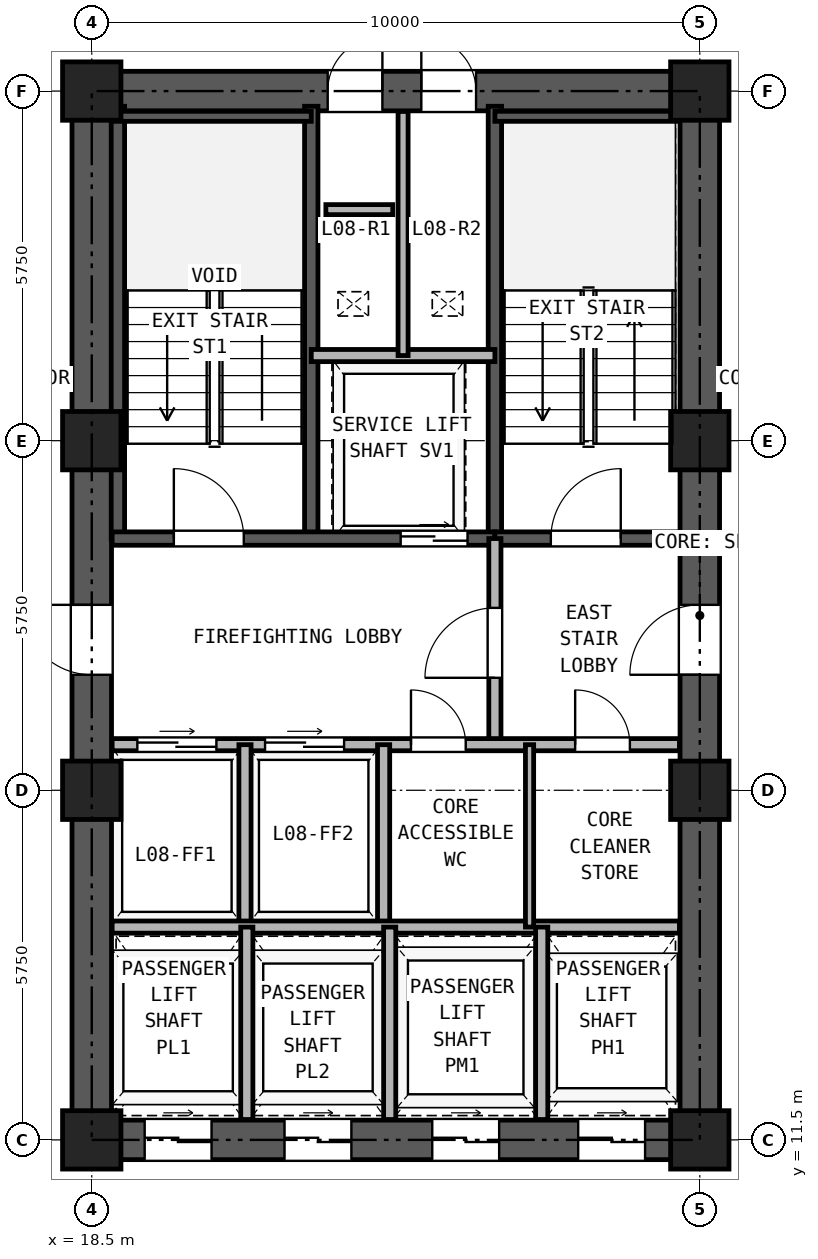
"""IFC4 building model, lengths in metres.
Left out: names, types, materials, properties, quantities, classifications, styles, units other than length and angle.
Written with IfcOpenShell. Run it as: python <this file> out.ifc"""

import sys

from ifc_helpers import new_model, si_unit, direction, frame, frame_2d, origin, origin_2d, place, context, subcontext, project, spatial, rectangle, hollow_rectangle, extrude, source, transform, mapped, element, fill, save


model = new_model("IFC4")
c1 = context("Model", 3, precision=1e-05, world=origin(), true_north=direction((0.0, 1.0)))
c2 = subcontext(c1, "Body", "Model", "MODEL_VIEW")
j1 = project(units=[si_unit("LENGTHUNIT", "METRE"), si_unit("PLANEANGLEUNIT", "RADIAN")], contexts=[c1])
p1 = place(None, origin())
s1 = spatial("IfcSite", under=j1, at=p1, CompositionType="ELEMENT")
p2 = place(p1, origin())
s2 = spatial("IfcBuilding", under=s1, at=p2, CompositionType="ELEMENT")
p3 = place(p2, frame((0.0, 0.0, 33.3)))
s3 = spatial("IfcBuildingStorey", under=s2, at=p3, CompositionType="ELEMENT", Elevation=33.3)
m1 = source(origin(), c2, "Body", "SweptSolid", [
    extrude(hollow_rectangle(XDim=0.96, YDim=0.96, WallThickness=0.06, at=origin_2d()), origin(), (0.0, 0.0, 1.0), 3.32),
])
for number, where, z_axis, x_axis in (
    (1, (18.5, 11.5, 0.0), (0.0, 0.0, 1.0), (1.0, 0.0, 0.0)),
    (2, (18.5, 17.25, 0.0), (0.0, 0.0, 1.0), (1.0, 0.0, 0.0)),
    (3, (18.5, 23.0, 0.0), (0.0, 0.0, 1.0), (1.0, 0.0, 0.0)),
    (4, (18.5, 28.75, 0.0), (0.0, 0.0, 1.0), (1.0, 0.0, 0.0)),
    (5, (28.5, 11.5, 0.0), (0.0, 0.0, 1.0), (1.0, 0.0, 0.0)),
    (6, (28.5, 17.25, 0.0), (0.0, 0.0, 1.0), (1.0, 0.0, 0.0)),
    (7, (28.5, 23.0, 0.0), (0.0, 0.0, 1.0), (1.0, 0.0, 0.0)),
    (8, (28.5, 28.75, 0.0), (0.0, 0.0, 1.0), (1.0, 0.0, 0.0)),
):
    element("IfcColumn", number, at=place(p3, frame(where, z_axis=z_axis, x_axis=x_axis)), inside=s3, PredefinedType="COLUMN", context=c2, shape_type="MappedRepresentation", body=[
        mapped(m1, transform((0.0, 0.0, 0.0), x_axis=(1.0, 0.0, 0.0), y_axis=(0.0, 1.0, 0.0), z_axis=(0.0, 0.0, 1.0), scale=1.0)),
    ])
p4 = place(p3, frame((18.175, 11.5, 0.0), z_axis=(0.0, 0.0, 1.0), x_axis=(1.0, 0.0, 0.0)))
e9 = element("IfcWall", 9, at=p4, inside=s3, PredefinedType="SHEAR", context=c2, shape_type="SweptSolid", body=[
    extrude(rectangle(XDim=10.65, YDim=0.65, at=frame_2d((5.325, 0.0))), origin(), (0.0, 0.0, 1.0), 3.32),
])
p5 = place(p4, frame((1.195, 0.0, 0.0)))
e10 = element("IfcOpeningElement", 10, at=p5, cuts=e9, PredefinedType="OPENING", context=c2, shape_type="SweptSolid", body=[
    extrude(rectangle(XDim=1.1, YDim=2.25, at=frame_2d((0.55, 1.125))), frame((0.0, 0.335, 0.0), z_axis=(0.0, -1.0, 0.0), x_axis=(1.0, 0.0, 0.0)), (0.0, 0.0, 1.0), 0.67),
])
p6 = place(p4, frame((3.495, 0.0, 0.0)))
e11 = element("IfcOpeningElement", 11, at=p6, cuts=e9, PredefinedType="OPENING", context=c2, shape_type="SweptSolid", body=[
    extrude(rectangle(XDim=1.1, YDim=2.25, at=frame_2d((0.55, 1.125))), frame((0.0, 0.335, 0.0), z_axis=(0.0, -1.0, 0.0), x_axis=(1.0, 0.0, 0.0)), (0.0, 0.0, 1.0), 0.67),
])
p7 = place(p4, frame((5.925, 0.0, 0.0)))
e12 = element("IfcOpeningElement", 12, at=p7, cuts=e9, PredefinedType="OPENING", context=c2, shape_type="SweptSolid", body=[
    extrude(rectangle(XDim=1.1, YDim=2.25, at=frame_2d((0.55, 1.125))), frame((0.0, 0.335, 0.0), z_axis=(0.0, -1.0, 0.0), x_axis=(1.0, 0.0, 0.0)), (0.0, 0.0, 1.0), 0.67),
])
p8 = place(p4, frame((8.325, 0.0, 0.0)))
e13 = element("IfcOpeningElement", 13, at=p8, cuts=e9, PredefinedType="OPENING", context=c2, shape_type="SweptSolid", body=[
    extrude(rectangle(XDim=1.1, YDim=2.25, at=frame_2d((0.55, 1.125))), frame((0.0, 0.335, 0.0), z_axis=(0.0, -1.0, 0.0), x_axis=(1.0, 0.0, 0.0)), (0.0, 0.0, 1.0), 0.67),
])
p9 = place(p3, frame((18.175, 28.75, 0.0), z_axis=(0.0, 0.0, 1.0), x_axis=(1.0, 0.0, 0.0)))
e14 = element("IfcWall", 14, at=p9, inside=s3, PredefinedType="SHEAR", context=c2, shape_type="SweptSolid", body=[
    extrude(rectangle(XDim=10.65, YDim=0.65, at=frame_2d((5.325, 0.0))), origin(), (0.0, 0.0, 1.0), 3.32),
])
p10 = place(p9, frame((4.205, 0.0, 0.0)))
e15 = element("IfcOpeningElement", 15, at=p10, cuts=e14, PredefinedType="OPENING", context=c2, shape_type="SweptSolid", body=[
    extrude(rectangle(XDim=0.9, YDim=2.05, at=frame_2d((0.45, 1.025))), frame((0.0, 0.335, 0.0), z_axis=(0.0, -1.0, 0.0), x_axis=(1.0, 0.0, 0.0)), (0.0, 0.0, 1.0), 0.67),
])
p11 = place(p9, frame((5.745, 0.0, 0.0)))
e16 = element("IfcOpeningElement", 16, at=p11, cuts=e14, PredefinedType="OPENING", context=c2, shape_type="SweptSolid", body=[
    extrude(rectangle(XDim=0.9, YDim=2.05, at=frame_2d((0.45, 1.025))), frame((0.0, 0.335, 0.0), z_axis=(0.0, -1.0, 0.0), x_axis=(1.0, 0.0, 0.0)), (0.0, 0.0, 1.0), 0.67),
])
p12 = place(p3, frame((18.5, 11.825, 0.0), z_axis=(0.0, 0.0, 1.0), x_axis=(0.0, 1.0, 0.0)))
e17 = element("IfcWall", 17, at=p12, inside=s3, PredefinedType="SHEAR", context=c2, shape_type="SweptSolid", body=[
    extrude(rectangle(XDim=16.6, YDim=0.65, at=frame_2d((8.3, 0.0))), origin(), (0.0, 0.0, 1.0), 3.32),
])
p13 = place(p12, frame((7.325, 0.0, 0.0)))
e18 = element("IfcOpeningElement", 18, at=p13, cuts=e17, PredefinedType="OPENING", context=c2, shape_type="SweptSolid", body=[
    extrude(rectangle(XDim=1.15, YDim=2.2, at=frame_2d((0.575, 1.1))), frame((0.0, 0.335, 0.0), z_axis=(0.0, -1.0, 0.0), x_axis=(1.0, 0.0, 0.0)), (0.0, 0.0, 1.0), 0.67),
])
p14 = place(p3, frame((28.5, 11.825, 0.0), z_axis=(0.0, 0.0, 1.0), x_axis=(0.0, 1.0, 0.0)))
e19 = element("IfcWall", 19, at=p14, inside=s3, PredefinedType="SHEAR", context=c2, shape_type="SweptSolid", body=[
    extrude(rectangle(XDim=16.6, YDim=0.65, at=frame_2d((8.3, 0.0))), origin(), (0.0, 0.0, 1.0), 3.32),
])
p15 = place(p14, frame((7.325, 0.0, 0.0)))
e20 = element("IfcOpeningElement", 20, at=p15, cuts=e19, PredefinedType="OPENING", context=c2, shape_type="SweptSolid", body=[
    extrude(rectangle(XDim=1.15, YDim=2.2, at=frame_2d((0.575, 1.1))), frame((0.0, 0.335, 0.0), z_axis=(0.0, -1.0, 0.0), x_axis=(1.0, 0.0, 0.0)), (0.0, 0.0, 1.0), 0.67),
])
for number, where, z_axis, x_axis in (
    (21, (18.93, 21.39, 0.0), (0.0, 0.0, 1.0), (0.0, 1.0, 0.0)),
    (22, (22.11, 21.39, 0.0), (0.0, 0.0, 1.0), (0.0, 1.0, 0.0)),
    (23, (25.13, 21.39, 0.0), (0.0, 0.0, 1.0), (0.0, 1.0, 0.0)),
):
    element("IfcWall", number, at=place(p3, frame(where, z_axis=z_axis, x_axis=x_axis)), inside=s3, PredefinedType="SOLIDWALL", context=c2, shape_type="SweptSolid", body=[
        extrude(rectangle(XDim=7.11, YDim=0.22, at=frame_2d((3.555, 0.0))), origin(), (0.0, 0.0, 1.0), 3.32),
    ])
p16 = place(p3, frame((18.835, 28.335, 0.0), z_axis=(0.0, 0.0, 1.0), x_axis=(1.0, 0.0, 0.0)))
e24 = element("IfcWall", 24, at=p16, inside=s3, PredefinedType="PARTITIONING", context=c2, shape_type="SweptSolid", body=[
    extrude(rectangle(XDim=3.275, YDim=0.165, at=frame_2d((1.638, 0.0))), origin(), (0.0, 0.0, 1.0), 3.32),
])
p17 = place(p3, frame((25.13, 28.335, 0.0), z_axis=(0.0, 0.0, 1.0), x_axis=(1.0, 0.0, 0.0)))
e25 = element("IfcWall", 25, at=p17, inside=s3, PredefinedType="PARTITIONING", context=c2, shape_type="SweptSolid", body=[
    extrude(rectangle(XDim=3.035, YDim=0.165, at=frame_2d((1.518, 0.0))), origin(), (0.0, 0.0, 1.0), 3.32),
])
p18 = place(p3, frame((18.835, 21.39, 0.0), z_axis=(0.0, 0.0, 1.0), x_axis=(1.0, 0.0, 0.0)))
e26 = element("IfcWall", 26, at=p18, inside=s3, PredefinedType="SOLIDWALL", context=c2, shape_type="SweptSolid", body=[
    extrude(rectangle(XDim=6.295, YDim=0.22, at=frame_2d((3.147, 0.0))), origin(), (0.0, 0.0, 1.0), 3.32),
])
p19 = place(p18, frame((1.015, 0.0, 0.0)))
e27 = element("IfcOpeningElement", 27, at=p19, cuts=e26, PredefinedType="OPENING", context=c2, shape_type="SweptSolid", body=[
    extrude(rectangle(XDim=1.15, YDim=2.2, at=frame_2d((0.575, 1.1))), frame((0.0, 0.12, 0.0), z_axis=(0.0, -1.0, 0.0), x_axis=(1.0, 0.0, 0.0)), (0.0, 0.0, 1.0), 0.24),
])
p20 = place(p18, frame((4.745, 0.0, 0.0)))
e28 = element("IfcOpeningElement", 28, at=p20, cuts=e26, PredefinedType="OPENING", context=c2, shape_type="SweptSolid", body=[
    extrude(rectangle(XDim=1.1, YDim=2.25, at=frame_2d((0.55, 1.125))), frame((0.0, 0.12, 0.0), z_axis=(0.0, -1.0, 0.0), x_axis=(1.0, 0.0, 0.0)), (0.0, 0.0, 1.0), 0.24),
])
p21 = place(p3, frame((25.13, 21.39, 0.0), z_axis=(0.0, 0.0, 1.0), x_axis=(1.0, 0.0, 0.0)))
e29 = element("IfcWall", 29, at=p21, inside=s3, PredefinedType="SOLIDWALL", context=c2, shape_type="SweptSolid", body=[
    extrude(rectangle(XDim=3.035, YDim=0.22, at=frame_2d((1.518, 0.0))), origin(), (0.0, 0.0, 1.0), 3.32),
])
p22 = place(p21, frame((0.92, 0.0, 0.0)))
e30 = element("IfcOpeningElement", 30, at=p22, cuts=e29, PredefinedType="OPENING", context=c2, shape_type="SweptSolid", body=[
    extrude(rectangle(XDim=1.15, YDim=2.2, at=frame_2d((0.575, 1.1))), frame((0.0, 0.12, 0.0), z_axis=(0.0, -1.0, 0.0), x_axis=(1.0, 0.0, 0.0)), (0.0, 0.0, 1.0), 0.24),
])
p23 = place(p3, frame((22.11, 24.4, 0.0), z_axis=(0.0, 0.0, 1.0), x_axis=(1.0, 0.0, 0.0)))
e31 = element("IfcWall", 31, at=p23, inside=s3, PredefinedType="PARTITIONING", context=c2, shape_type="SweptSolid", body=[
    extrude(rectangle(XDim=3.02, YDim=0.2, at=frame_2d((1.51, 0.0))), origin(), (0.0, 0.0, 1.0), 3.32),
])
p24 = place(p3, frame((23.62, 24.4, 0.0), z_axis=(0.0, 0.0, 1.0), x_axis=(0.0, 1.0, 0.0)))
e32 = element("IfcWall", 32, at=p24, inside=s3, PredefinedType="PARTITIONING", context=c2, shape_type="SweptSolid", body=[
    extrude(rectangle(XDim=4.015, YDim=0.165, at=frame_2d((2.008, 0.0))), origin(), (0.0, 0.0, 1.0), 3.32),
])
p25 = place(p3, frame((25.13, 18.0, 0.0), z_axis=(0.0, 0.0, 1.0), x_axis=(0.0, 1.0, 0.0)))
e33 = element("IfcWall", 33, at=p25, inside=s3, PredefinedType="PARTITIONING", context=c2, shape_type="SweptSolid", body=[
    extrude(rectangle(XDim=3.39, YDim=0.2, at=frame_2d((1.695, 0.0))), origin(), (0.0, 0.0, 1.0), 3.32),
])
p26 = place(p25, frame((1.1, 0.0, 0.0)))
e34 = element("IfcOpeningElement", 34, at=p26, cuts=e33, PredefinedType="OPENING", context=c2, shape_type="SweptSolid", body=[
    extrude(rectangle(XDim=1.15, YDim=2.2, at=frame_2d((0.575, 1.1))), frame((0.0, 0.11, 0.0), z_axis=(0.0, -1.0, 0.0), x_axis=(1.0, 0.0, 0.0)), (0.0, 0.0, 1.0), 0.22),
])
p27 = place(p3, frame((18.835, 18.0, 0.0), z_axis=(0.0, 0.0, 1.0), x_axis=(1.0, 0.0, 0.0)))
e35 = element("IfcWall", 35, at=p27, inside=s3, PredefinedType="PARTITIONING", context=c2, shape_type="SweptSolid", body=[
    extrude(rectangle(XDim=9.33, YDim=0.2, at=frame_2d((4.665, 0.0))), origin(), (0.0, 0.0, 1.0), 3.32),
])
p28 = place(p27, frame((0.415, 0.0, 0.0)))
e36 = element("IfcOpeningElement", 36, at=p28, cuts=e35, PredefinedType="OPENING", context=c2, shape_type="SweptSolid", body=[
    extrude(rectangle(XDim=1.3, YDim=2.3, at=frame_2d((0.65, 1.15))), frame((0.0, 0.11, 0.0), z_axis=(0.0, -1.0, 0.0), x_axis=(1.0, 0.0, 0.0)), (0.0, 0.0, 1.0), 0.22),
])
p29 = place(p27, frame((2.515, 0.0, 0.0)))
e37 = element("IfcOpeningElement", 37, at=p29, cuts=e35, PredefinedType="OPENING", context=c2, shape_type="SweptSolid", body=[
    extrude(rectangle(XDim=1.3, YDim=2.3, at=frame_2d((0.65, 1.15))), frame((0.0, 0.11, 0.0), z_axis=(0.0, -1.0, 0.0), x_axis=(1.0, 0.0, 0.0)), (0.0, 0.0, 1.0), 0.22),
])
p30 = place(p27, frame((4.915, 0.0, 0.0)))
e38 = element("IfcOpeningElement", 38, at=p30, cuts=e35, PredefinedType="OPENING", context=c2, shape_type="SweptSolid", body=[
    extrude(rectangle(XDim=0.9, YDim=2.05, at=frame_2d((0.45, 1.025))), frame((0.0, 0.11, 0.0), z_axis=(0.0, -1.0, 0.0), x_axis=(1.0, 0.0, 0.0)), (0.0, 0.0, 1.0), 0.22),
])
p31 = place(p27, frame((7.615, 0.0, 0.0)))
e39 = element("IfcOpeningElement", 39, at=p31, cuts=e35, PredefinedType="OPENING", context=c2, shape_type="SweptSolid", body=[
    extrude(rectangle(XDim=0.9, YDim=2.05, at=frame_2d((0.45, 1.025))), frame((0.0, 0.11, 0.0), z_axis=(0.0, -1.0, 0.0), x_axis=(1.0, 0.0, 0.0)), (0.0, 0.0, 1.0), 0.22),
])
for number, where, z_axis, x_axis in (
    (40, (21.02, 15.0, 0.0), (0.0, 0.0, 1.0), (0.0, 1.0, 0.0)),
    (41, (23.3, 15.0, 0.0), (0.0, 0.0, 1.0), (0.0, 1.0, 0.0)),
):
    element("IfcWall", number, at=place(p3, frame(where, z_axis=z_axis, x_axis=x_axis)), inside=s3, PredefinedType="PARTITIONING", context=c2, shape_type="SweptSolid", body=[
        extrude(rectangle(XDim=3.0, YDim=0.2, at=frame_2d((1.5, 0.0))), origin(), (0.0, 0.0, 1.0), 3.32),
    ])
p32 = place(p3, frame((18.835, 15.0, 0.0), z_axis=(0.0, 0.0, 1.0), x_axis=(1.0, 0.0, 0.0)))
e42 = element("IfcWall", 42, at=p32, inside=s3, PredefinedType="PARTITIONING", context=c2, shape_type="SweptSolid", body=[
    extrude(rectangle(XDim=9.33, YDim=0.2, at=frame_2d((4.665, 0.0))), origin(), (0.0, 0.0, 1.0), 3.32),
])
p33 = place(p3, frame((25.7, 15.0, 0.0), z_axis=(0.0, 0.0, 1.0), x_axis=(0.0, 1.0, 0.0)))
e43 = element("IfcWall", 43, at=p33, inside=s3, PredefinedType="PARTITIONING", context=c2, shape_type="SweptSolid", body=[
    extrude(rectangle(XDim=3.0, YDim=0.135, at=frame_2d((1.5, 0.0))), origin(), (0.0, 0.0, 1.0), 3.32),
])
for number, where, z_axis, x_axis in (
    (44, (21.05, 11.835, 0.0), (0.0, 0.0, 1.0), (0.0, 1.0, 0.0)),
    (45, (23.4, 11.835, 0.0), (0.0, 0.0, 1.0), (0.0, 1.0, 0.0)),
    (46, (25.9, 11.835, 0.0), (0.0, 0.0, 1.0), (0.0, 1.0, 0.0)),
):
    element("IfcWall", number, at=place(p3, frame(where, z_axis=z_axis, x_axis=x_axis)), inside=s3, PredefinedType="PARTITIONING", context=c2, shape_type="SweptSolid", body=[
        extrude(rectangle(XDim=3.165, YDim=0.2, at=frame_2d((1.583, 0.0))), origin(), (0.0, 0.0, 1.0), 3.32),
    ])
p34 = place(p3, frame((22.35, 26.8, 0.0), z_axis=(0.0, 0.0, 1.0), x_axis=(1.0, 0.0, 0.0)))
e47 = element("IfcWall", 47, at=p34, inside=s3, PredefinedType="PARTITIONING", context=c2, shape_type="SweptSolid", body=[
    extrude(rectangle(XDim=1.1, YDim=0.165, at=frame_2d((0.55, 0.0))), origin(), (0.0, 0.0, 1.0), 3.32),
])
p35 = place(p19, frame((1.15, 0.0, 0.0), z_axis=(0.0, 0.0, 1.0), x_axis=(-1.0, 0.0, 0.0)))
e48 = element("IfcDoor", 48, at=p35, inside=s3, OperationType="SINGLE_SWING_LEFT", PredefinedType="DOOR", context=c2, shape_type="SweptSolid", body=[
    extrude(rectangle(XDim=1.15, YDim=2.2, at=frame_2d((0.575, 1.1))), frame((0.0, 0.025, 0.0), z_axis=(0.0, -1.0, 0.0), x_axis=(1.0, 0.0, 0.0)), (0.0, 0.0, 1.0), 0.05),
])
fill(e27, e48)
p36 = place(p22, frame((1.15, 0.0, 0.0), z_axis=(0.0, 0.0, 1.0), x_axis=(-1.0, 0.0, 0.0)))
e49 = element("IfcDoor", 49, at=p36, inside=s3, OperationType="SINGLE_SWING_RIGHT", PredefinedType="DOOR", context=c2, shape_type="SweptSolid", body=[
    extrude(rectangle(XDim=1.15, YDim=2.2, at=frame_2d((0.575, 1.1))), frame((0.0, 0.025, 0.0), z_axis=(0.0, -1.0, 0.0), x_axis=(1.0, 0.0, 0.0)), (0.0, 0.0, 1.0), 0.05),
])
fill(e30, e49)
p37 = place(p20, frame((1.1, 0.0, 0.0), z_axis=(0.0, 0.0, 1.0), x_axis=(-1.0, 0.0, 0.0)))
e50 = element("IfcDoor", 50, at=p37, inside=s3, OperationType="DOUBLE_DOOR_SLIDING", PredefinedType="DOOR", context=c2, shape_type="SweptSolid", body=[
    extrude(rectangle(XDim=1.1, YDim=2.25, at=frame_2d((0.55, 1.125))), frame((0.0, 0.025, 0.0), z_axis=(0.0, -1.0, 0.0), x_axis=(1.0, 0.0, 0.0)), (0.0, 0.0, 1.0), 0.05),
])
fill(e28, e50)
p38 = place(p26, origin())
e51 = element("IfcDoor", 51, at=p38, inside=s3, OperationType="SINGLE_SWING_LEFT", PredefinedType="DOOR", context=c2, shape_type="SweptSolid", body=[
    extrude(rectangle(XDim=1.15, YDim=2.2, at=frame_2d((0.575, 1.1))), frame((0.0, 0.025, 0.0), z_axis=(0.0, -1.0, 0.0), x_axis=(1.0, 0.0, 0.0)), (0.0, 0.0, 1.0), 0.05),
])
fill(e34, e51)
p39 = place(p28, origin())
e52 = element("IfcDoor", 52, at=p39, inside=s3, OperationType="DOUBLE_DOOR_SLIDING", PredefinedType="DOOR", context=c2, shape_type="SweptSolid", body=[
    extrude(rectangle(XDim=1.3, YDim=2.3, at=frame_2d((0.65, 1.15))), frame((0.0, 0.025, 0.0), z_axis=(0.0, -1.0, 0.0), x_axis=(1.0, 0.0, 0.0)), (0.0, 0.0, 1.0), 0.05),
])
fill(e36, e52)
p40 = place(p29, origin())
e53 = element("IfcDoor", 53, at=p40, inside=s3, OperationType="DOUBLE_DOOR_SLIDING", PredefinedType="DOOR", context=c2, shape_type="SweptSolid", body=[
    extrude(rectangle(XDim=1.3, YDim=2.3, at=frame_2d((0.65, 1.15))), frame((0.0, 0.025, 0.0), z_axis=(0.0, -1.0, 0.0), x_axis=(1.0, 0.0, 0.0)), (0.0, 0.0, 1.0), 0.05),
])
fill(e37, e53)
p41 = place(p30, frame((0.9, 0.0, 0.0), z_axis=(0.0, 0.0, 1.0), x_axis=(-1.0, 0.0, 0.0)))
e54 = element("IfcDoor", 54, at=p41, inside=s3, OperationType="SINGLE_SWING_LEFT", PredefinedType="DOOR", context=c2, shape_type="SweptSolid", body=[
    extrude(rectangle(XDim=0.9, YDim=2.05, at=frame_2d((0.45, 1.025))), frame((0.0, 0.025, 0.0), z_axis=(0.0, -1.0, 0.0), x_axis=(1.0, 0.0, 0.0)), (0.0, 0.0, 1.0), 0.05),
])
fill(e38, e54)
p42 = place(p31, frame((0.9, 0.0, 0.0), z_axis=(0.0, 0.0, 1.0), x_axis=(-1.0, 0.0, 0.0)))
e55 = element("IfcDoor", 55, at=p42, inside=s3, OperationType="SINGLE_SWING_LEFT", PredefinedType="DOOR", context=c2, shape_type="SweptSolid", body=[
    extrude(rectangle(XDim=0.9, YDim=2.05, at=frame_2d((0.45, 1.025))), frame((0.0, 0.025, 0.0), z_axis=(0.0, -1.0, 0.0), x_axis=(1.0, 0.0, 0.0)), (0.0, 0.0, 1.0), 0.05),
])
fill(e39, e55)
p43 = place(p13, frame((1.15, 0.0, 0.0), z_axis=(0.0, 0.0, 1.0), x_axis=(-1.0, 0.0, 0.0)))
e56 = element("IfcDoor", 56, at=p43, inside=s3, OperationType="SINGLE_SWING_RIGHT", PredefinedType="DOOR", context=c2, shape_type="SweptSolid", body=[
    extrude(rectangle(XDim=1.15, YDim=2.2, at=frame_2d((0.575, 1.1))), frame((0.0, 0.025, 0.0), z_axis=(0.0, -1.0, 0.0), x_axis=(1.0, 0.0, 0.0)), (0.0, 0.0, 1.0), 0.05),
])
fill(e18, e56)
p44 = place(p15, origin())
e57 = element("IfcDoor", 57, at=p44, inside=s3, OperationType="SINGLE_SWING_LEFT", PredefinedType="DOOR", context=c2, shape_type="SweptSolid", body=[
    extrude(rectangle(XDim=1.15, YDim=2.2, at=frame_2d((0.575, 1.1))), frame((0.0, 0.025, 0.0), z_axis=(0.0, -1.0, 0.0), x_axis=(1.0, 0.0, 0.0)), (0.0, 0.0, 1.0), 0.05),
])
fill(e20, e57)
p45 = place(p10, origin())
e58 = element("IfcDoor", 58, at=p45, inside=s3, OperationType="SINGLE_SWING_RIGHT", PredefinedType="DOOR", context=c2, shape_type="SweptSolid", body=[
    extrude(rectangle(XDim=0.9, YDim=2.05, at=frame_2d((0.45, 1.025))), frame((0.0, 0.025, 0.0), z_axis=(0.0, -1.0, 0.0), x_axis=(1.0, 0.0, 0.0)), (0.0, 0.0, 1.0), 0.05),
])
fill(e15, e58)
p46 = place(p11, origin())
e59 = element("IfcDoor", 59, at=p46, inside=s3, OperationType="SINGLE_SWING_LEFT", PredefinedType="DOOR", context=c2, shape_type="SweptSolid", body=[
    extrude(rectangle(XDim=0.9, YDim=2.05, at=frame_2d((0.45, 1.025))), frame((0.0, 0.025, 0.0), z_axis=(0.0, -1.0, 0.0), x_axis=(1.0, 0.0, 0.0)), (0.0, 0.0, 1.0), 0.05),
])
fill(e16, e59)
p47 = place(p5, frame((1.1, 0.0, 0.0), z_axis=(0.0, 0.0, 1.0), x_axis=(-1.0, 0.0, 0.0)))
e60 = element("IfcDoor", 60, at=p47, inside=s3, OperationType="DOUBLE_DOOR_SLIDING", PredefinedType="DOOR", context=c2, shape_type="SweptSolid", body=[
    extrude(rectangle(XDim=1.1, YDim=2.25, at=frame_2d((0.55, 1.125))), frame((0.0, 0.025, 0.0), z_axis=(0.0, -1.0, 0.0), x_axis=(1.0, 0.0, 0.0)), (0.0, 0.0, 1.0), 0.05),
])
fill(e10, e60)
p48 = place(p6, frame((1.1, 0.0, 0.0), z_axis=(0.0, 0.0, 1.0), x_axis=(-1.0, 0.0, 0.0)))
e61 = element("IfcDoor", 61, at=p48, inside=s3, OperationType="DOUBLE_DOOR_SLIDING", PredefinedType="DOOR", context=c2, shape_type="SweptSolid", body=[
    extrude(rectangle(XDim=1.1, YDim=2.25, at=frame_2d((0.55, 1.125))), frame((0.0, 0.025, 0.0), z_axis=(0.0, -1.0, 0.0), x_axis=(1.0, 0.0, 0.0)), (0.0, 0.0, 1.0), 0.05),
])
fill(e11, e61)
p49 = place(p7, frame((1.1, 0.0, 0.0), z_axis=(0.0, 0.0, 1.0), x_axis=(-1.0, 0.0, 0.0)))
e62 = element("IfcDoor", 62, at=p49, inside=s3, OperationType="DOUBLE_DOOR_SLIDING", PredefinedType="DOOR", context=c2, shape_type="SweptSolid", body=[
    extrude(rectangle(XDim=1.1, YDim=2.25, at=frame_2d((0.55, 1.125))), frame((0.0, 0.025, 0.0), z_axis=(0.0, -1.0, 0.0), x_axis=(1.0, 0.0, 0.0)), (0.0, 0.0, 1.0), 0.05),
])
fill(e12, e62)
p50 = place(p8, frame((1.1, 0.0, 0.0), z_axis=(0.0, 0.0, 1.0), x_axis=(-1.0, 0.0, 0.0)))
e63 = element("IfcDoor", 63, at=p50, inside=s3, OperationType="DOUBLE_DOOR_SLIDING", PredefinedType="DOOR", context=c2, shape_type="SweptSolid", body=[
    extrude(rectangle(XDim=1.1, YDim=2.25, at=frame_2d((0.55, 1.125))), frame((0.0, 0.025, 0.0), z_axis=(0.0, -1.0, 0.0), x_axis=(1.0, 0.0, 0.0)), (0.0, 0.0, 1.0), 0.05),
])
fill(e13, e63)
save(model, sys.argv[1])
